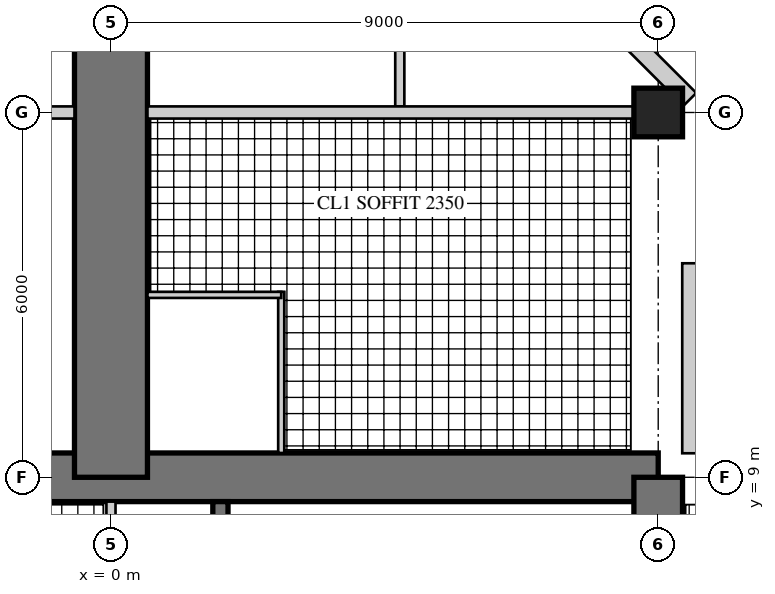
"""IFC4 building model, lengths in metres.
Left out: names, types, materials, properties, quantities, classifications, styles, units other than length and angle.
Written with IfcOpenShell. Run it as: python <this file> out.ifc"""

import sys

from ifc_helpers import new_model, si_unit, direction, frame, frame_2d, origin, origin_2d, place, context, subcontext, project, spatial, rectangle, hollow_rectangle, extrude, element, fill, save


model = new_model("IFC4")
c1 = context("Model", 3, precision=1e-05, world=origin(), true_north=direction((0.0, 1.0)))
c2 = subcontext(c1, "Body", "Model", "MODEL_VIEW")
j1 = project(units=[si_unit("LENGTHUNIT", "METRE"), si_unit("PLANEANGLEUNIT", "RADIAN")], contexts=[c1])
p1 = place(None, origin())
s1 = spatial("IfcSite", under=j1, at=p1, CompositionType="ELEMENT")
p2 = place(p1, origin())
s2 = spatial("IfcBuilding", under=s1, at=p2, CompositionType="ELEMENT")
p3 = place(p2, frame((0.0, 0.0, 225.5)))
s3 = spatial("IfcBuildingStorey", under=s2, at=p3, CompositionType="ELEMENT", Elevation=225.5)
p4 = place(p3, frame((9.0, 9.0, 0.0), z_axis=(0.0, 0.0, 1.0), x_axis=(-1.0, 0.0, 0.0)))
e1 = element("IfcWall", 1, at=p4, inside=s3, PredefinedType="SHEAR", context=c2, shape_type="SweptSolid", body=[
    extrude(rectangle(XDim=18.0, YDim=0.8, at=frame_2d((9.0, 0.0))), origin(), (0.0, 0.0, 1.0), 3.4),
])
p5 = place(p4, frame((9.8, 0.0, 0.0)))
e2 = element("IfcOpeningElement", 2, at=p5, cuts=e1, PredefinedType="OPENING", context=c2, shape_type="SweptSolid", body=[
    extrude(rectangle(XDim=1.0, YDim=2.4, at=frame_2d((0.5, 1.2))), frame((0.0, 0.41, 0.0), z_axis=(0.0, -1.0, 0.0), x_axis=(1.0, 0.0, 0.0)), (0.0, 0.0, 1.0), 0.82),
])
p6 = place(p3, frame((9.0, -9.0, 0.0), z_axis=(0.0, 0.0, 1.0), x_axis=(0.0, 1.0, 0.0)))
e3 = element("IfcWall", 3, at=p6, inside=s3, PredefinedType="SHEAR", context=c2, shape_type="SweptSolid", body=[
    extrude(rectangle(XDim=18.0, YDim=0.8, at=frame_2d((9.0, 0.0))), origin(), (0.0, 0.0, 1.0), 3.4),
])
p7 = place(p6, frame((9.8, 0.0, 0.0)))
e4 = element("IfcOpeningElement", 4, at=p7, cuts=e3, PredefinedType="OPENING", context=c2, shape_type="SweptSolid", body=[
    extrude(rectangle(XDim=1.0, YDim=2.4, at=frame_2d((0.5, 1.2))), frame((0.0, 0.41, 0.0), z_axis=(0.0, -1.0, 0.0), x_axis=(1.0, 0.0, 0.0)), (0.0, 0.0, 1.0), 0.82),
])
p8 = place(p3, frame((1.8, 1.875, 0.0), z_axis=(0.0, 0.0, 1.0), x_axis=(0.0, 1.0, 0.0)))
e5 = element("IfcWall", 5, at=p8, inside=s3, PredefinedType="SHEAR", context=c2, shape_type="SweptSolid", body=[
    extrude(rectangle(XDim=6.725, YDim=0.25, at=frame_2d((3.363, 0.0))), origin(), (0.0, 0.0, 1.0), 3.4),
])
p9 = place(p8, frame((1.875, 0.0, 0.0)))
e6 = element("IfcOpeningElement", 6, at=p9, cuts=e5, PredefinedType="OPENING", context=c2, shape_type="SweptSolid", body=[
    extrude(rectangle(XDim=1.6, YDim=2.4, at=frame_2d((0.8, 1.2))), frame((0.0, 0.135, 0.0), z_axis=(0.0, -1.0, 0.0), x_axis=(1.0, 0.0, 0.0)), (0.0, 0.0, 1.0), 0.27),
])
p10 = place(p3, frame((0.0, 9.0, 0.0), z_axis=(0.0, 0.0, 1.0), x_axis=(0.0, 1.0, 0.0)))
e7 = element("IfcWall", 7, at=p10, inside=s3, PredefinedType="SHEAR", context=c2, shape_type="SweptSolid", body=[
    extrude(rectangle(XDim=9.0, YDim=1.2, at=frame_2d((4.5, 0.0))), origin(), (0.0, 0.0, 1.0), 3.4),
])
p11 = place(p10, frame((3.8, 0.0, 0.0)))
e8 = element("IfcOpeningElement", 8, at=p11, cuts=e7, PredefinedType="OPENING", context=c2, shape_type="SweptSolid", body=[
    extrude(rectangle(XDim=1.0, YDim=2.15, at=frame_2d((0.5, 1.075))), frame((0.0, 0.61, 0.0), z_axis=(0.0, -1.0, 0.0), x_axis=(1.0, 0.0, 0.0)), (0.0, 0.0, 1.0), 1.22),
])
p12 = place(p10, frame((7.0, 0.0, 0.0)))
e9 = element("IfcOpeningElement", 9, at=p12, cuts=e7, PredefinedType="OPENING", context=c2, shape_type="SweptSolid", body=[
    extrude(rectangle(XDim=1.0, YDim=2.2, at=frame_2d((0.5, 1.1))), frame((0.0, 0.61, 0.0), z_axis=(0.0, -1.0, 0.0), x_axis=(1.0, 0.0, 0.0)), (0.0, 0.0, 1.0), 1.22),
])
p13 = place(p3, frame((9.0, 15.0, 0.0), z_axis=(0.0, 0.0, 1.0), x_axis=(1.0, 0.0, 0.0)))
e10 = element("IfcColumn", 10, at=p13, inside=s3, PredefinedType="COLUMN", context=c2, shape_type="SweptSolid", body=[
    extrude(rectangle(XDim=0.8, YDim=0.8, at=origin_2d()), origin(), (0.0, 0.0, 1.0), 3.4),
])
p14 = place(p3, frame((9.52, 9.395, 0.0), z_axis=(0.0, 0.0, 1.0), x_axis=(0.0, 1.0, 0.0)))
e11 = element("IfcWall", 11, at=p14, inside=s3, PredefinedType="SOLIDWALL", context=c2, shape_type="SweptSolid", body=[
    extrude(rectangle(XDim=3.125, YDim=0.25, at=frame_2d((1.562, 0.0))), origin(), (0.0, 0.0, 1.0), 3.22),
])
p15 = place(p14, frame((0.6, 0.0, 0.0)))
e12 = element("IfcOpeningElement", 12, at=p15, cuts=e11, PredefinedType="OPENING", context=c2, shape_type="SweptSolid", body=[
    extrude(rectangle(XDim=1.0, YDim=2.2, at=frame_2d((0.5, 1.1))), frame((0.0, 0.135, 0.0), z_axis=(0.0, -1.0, 0.0), x_axis=(1.0, 0.0, 0.0)), (0.0, 0.0, 1.0), 0.27),
])
p16 = place(p3, frame((9.52, 15.215, 0.0), z_axis=(0.0, 0.0, 1.0), x_axis=(-0.707081278264, 0.707132283189, 0.0)))
e13 = element("IfcWall", 13, at=p16, inside=s3, PredefinedType="SOLIDWALL", context=c2, shape_type="SweptSolid", body=[
    extrude(rectangle(XDim=4.787, YDim=0.3, at=frame_2d((2.393, 0.0))), origin(), (0.0, 0.0, 1.0), 3.22),
])
p17 = place(p16, frame((1.943, 0.0, 0.3)))
e14 = element("IfcOpeningElement", 14, at=p17, cuts=e13, PredefinedType="OPENING", context=c2, shape_type="SweptSolid", body=[
    extrude(rectangle(XDim=0.9, YDim=2.4, at=frame_2d((0.45, 1.2))), frame((0.0, 0.16, 0.0), z_axis=(0.0, -1.0, 0.0), x_axis=(1.0, 0.0, 0.0)), (0.0, 0.0, 1.0), 0.32),
])
p18 = place(p3, frame((0.0, 5.675, 0.0), z_axis=(0.0, 0.0, 1.0), x_axis=(0.0, 1.0, 0.0)))
e15 = element("IfcWall", 15, at=p18, inside=s3, PredefinedType="PARTITIONING", context=c2, shape_type="SweptSolid", body=[
    extrude(rectangle(XDim=2.925, YDim=0.15, at=frame_2d((1.462, 0.0))), origin(), (0.0, 0.0, 1.0), 3.22),
])
p19 = place(p18, frame((0.4, 0.0, 0.0)))
e16 = element("IfcOpeningElement", 16, at=p19, cuts=e15, PredefinedType="OPENING", context=c2, shape_type="SweptSolid", body=[
    extrude(rectangle(XDim=1.0, YDim=2.1, at=frame_2d((0.5, 1.05))), frame((0.0, 0.085, 0.0), z_axis=(0.0, -1.0, 0.0), x_axis=(1.0, 0.0, 0.0)), (0.0, 0.0, 1.0), 0.17),
])
p20 = place(p3, frame((2.8, 9.4, 0.0), z_axis=(0.0, 0.0, 1.0), x_axis=(0.0, 1.0, 0.0)))
e17 = element("IfcWall", 17, at=p20, inside=s3, PredefinedType="PARTITIONING", context=c2, shape_type="SweptSolid", body=[
    extrude(rectangle(XDim=2.65, YDim=0.1, at=frame_2d((1.325, 0.0))), origin(), (0.0, 0.0, 1.0), 3.22),
])
p21 = place(p3, frame((2.8, 12.0, 0.0), z_axis=(0.0, 0.0, 1.0), x_axis=(-1.0, 0.0, 0.0)))
e18 = element("IfcWall", 18, at=p21, inside=s3, PredefinedType="PARTITIONING", context=c2, shape_type="SweptSolid", body=[
    extrude(rectangle(XDim=2.2, YDim=0.1, at=frame_2d((1.1, 0.0))), origin(), (0.0, 0.0, 1.0), 3.22),
])
p22 = place(p21, frame((0.55, 0.0, 0.0)))
e19 = element("IfcOpeningElement", 19, at=p22, cuts=e18, PredefinedType="OPENING", context=c2, shape_type="SweptSolid", body=[
    extrude(rectangle(XDim=0.9, YDim=2.1, at=frame_2d((0.45, 1.05))), frame((0.0, 0.06, 0.0), z_axis=(0.0, -1.0, 0.0), x_axis=(1.0, 0.0, 0.0)), (0.0, 0.0, 1.0), 0.12),
])
p23 = place(p3, frame((4.75, 15.1, 0.0), z_axis=(0.0, 0.0, 1.0), x_axis=(0.0, 1.0, 0.0)))
e20 = element("IfcWall", 20, at=p23, inside=s3, PredefinedType="PARTITIONING", context=c2, shape_type="SweptSolid", body=[
    extrude(rectangle(XDim=2.5, YDim=0.15, at=frame_2d((1.25, 0.0))), origin(), (0.0, 0.0, 1.0), 3.22),
])
p24 = place(p23, frame((0.6, 0.0, 0.0)))
e21 = element("IfcOpeningElement", 21, at=p24, cuts=e20, PredefinedType="OPENING", context=c2, shape_type="SweptSolid", body=[
    extrude(rectangle(XDim=1.0, YDim=2.1, at=frame_2d((0.5, 1.05))), frame((0.0, 0.085, 0.0), z_axis=(0.0, -1.0, 0.0), x_axis=(1.0, 0.0, 0.0)), (0.0, 0.0, 1.0), 0.17),
])
p25 = place(p3, frame((8.6, 15.0, 0.0), z_axis=(0.0, 0.0, 1.0), x_axis=(-1.0, 0.0, 0.0)))
e22 = element("IfcWall", 22, at=p25, inside=s3, PredefinedType="SOLIDWALL", context=c2, shape_type="SweptSolid", body=[
    extrude(rectangle(XDim=8.0, YDim=0.2, at=frame_2d((4.0, 0.0))), origin(), (0.0, 0.0, 1.0), 2.52),
])
p26 = place(p3, frame((-0.6, 15.0, 0.0), z_axis=(0.0, 0.0, 1.0), x_axis=(-1.0, 0.0, 0.0)))
e23 = element("IfcWall", 23, at=p26, inside=s3, PredefinedType="SOLIDWALL", context=c2, shape_type="SweptSolid", body=[
    extrude(rectangle(XDim=8.0, YDim=0.2, at=frame_2d((4.0, 0.0))), origin(), (0.0, 0.0, 1.0), 2.52),
])
p27 = place(p26, frame((0.35, 0.0, 0.0)))
e24 = element("IfcOpeningElement", 24, at=p27, cuts=e23, PredefinedType="OPENING", context=c2, shape_type="SweptSolid", body=[
    extrude(rectangle(XDim=1.0, YDim=2.2, at=frame_2d((0.5, 1.1))), frame((0.0, 0.11, 0.0), z_axis=(0.0, -1.0, 0.0), x_axis=(1.0, 0.0, 0.0)), (0.0, 0.0, 1.0), 0.22),
])
p28 = place(p15, origin())
e25 = element("IfcDoor", 25, at=p28, inside=s3, OperationType="SINGLE_SWING_LEFT", PredefinedType="DOOR", context=c2, shape_type="SweptSolid", body=[
    extrude(hollow_rectangle(XDim=1.0, YDim=2.2, WallThickness=0.06, at=frame_2d((0.5, 1.1))), frame((0.0, 0.025, 0.0), z_axis=(0.0, -1.0, 0.0), x_axis=(1.0, 0.0, 0.0)), (0.0, 0.0, 1.0), 0.05),
    extrude(rectangle(XDim=0.879, YDim=2.079, at=frame_2d((0.5, 1.1))), frame((0.0, 0.025, 0.0), z_axis=(0.0, -1.0, 0.0), x_axis=(1.0, 0.0, 0.0)), (0.0, 0.0, 1.0), 0.05),
])
fill(e12, e25)
p29 = place(p22, origin())
e26 = element("IfcDoor", 26, at=p29, inside=s3, OperationType="SINGLE_SWING_LEFT", PredefinedType="DOOR", context=c2, shape_type="SweptSolid", body=[
    extrude(rectangle(XDim=0.9, YDim=2.1, at=frame_2d((0.45, 1.05))), frame((0.0, 0.025, 0.0), z_axis=(0.0, -1.0, 0.0), x_axis=(1.0, 0.0, 0.0)), (0.0, 0.0, 1.0), 0.05),
])
fill(e19, e26)
p30 = place(p24, frame((1.0, 0.0, 0.0), z_axis=(0.0, 0.0, 1.0), x_axis=(-1.0, 0.0, 0.0)))
e27 = element("IfcDoor", 27, at=p30, inside=s3, OperationType="SINGLE_SWING_RIGHT", PredefinedType="DOOR", context=c2, shape_type="SweptSolid", body=[
    extrude(rectangle(XDim=1.0, YDim=2.1, at=frame_2d((0.5, 1.05))), frame((0.0, 0.025, 0.0), z_axis=(0.0, -1.0, 0.0), x_axis=(1.0, 0.0, 0.0)), (0.0, 0.0, 1.0), 0.05),
])
fill(e21, e27)
p31 = place(p27, frame((1.0, 0.0, 0.0), z_axis=(0.0, 0.0, 1.0), x_axis=(-1.0, 0.0, 0.0)))
e28 = element("IfcDoor", 28, at=p31, inside=s3, OperationType="SINGLE_SWING_RIGHT", PredefinedType="DOOR", context=c2, shape_type="SweptSolid", body=[
    extrude(rectangle(XDim=1.0, YDim=2.2, at=frame_2d((0.5, 1.1))), frame((0.0, 0.025, 0.0), z_axis=(0.0, -1.0, 0.0), x_axis=(1.0, 0.0, 0.0)), (0.0, 0.0, 1.0), 0.05),
])
fill(e24, e28)
p32 = place(p11, frame((1.0, 0.0, 0.0), z_axis=(0.0, 0.0, 1.0), x_axis=(-1.0, 0.0, 0.0)))
e29 = element("IfcDoor", 29, at=p32, inside=s3, OperationType="SINGLE_SWING_RIGHT", PredefinedType="DOOR", context=c2, shape_type="SweptSolid", body=[
    extrude(rectangle(XDim=1.0, YDim=2.15, at=frame_2d((0.5, 1.075))), frame((0.0, 0.025, 0.0), z_axis=(0.0, -1.0, 0.0), x_axis=(1.0, 0.0, 0.0)), (0.0, 0.0, 1.0), 0.05),
])
fill(e8, e29)
p33 = place(p5, origin())
e30 = element("IfcDoor", 30, at=p33, inside=s3, OperationType="SINGLE_SWING_RIGHT", PredefinedType="DOOR", context=c2, shape_type="SweptSolid", body=[
    extrude(rectangle(XDim=1.0, YDim=2.4, at=frame_2d((0.5, 1.2))), frame((0.0, 0.055, 0.0), z_axis=(0.0, -1.0, 0.0), x_axis=(1.0, 0.0, 0.0)), (0.0, 0.0, 1.0), 0.05),
])
fill(e2, e30)
save(model, sys.argv[1])
